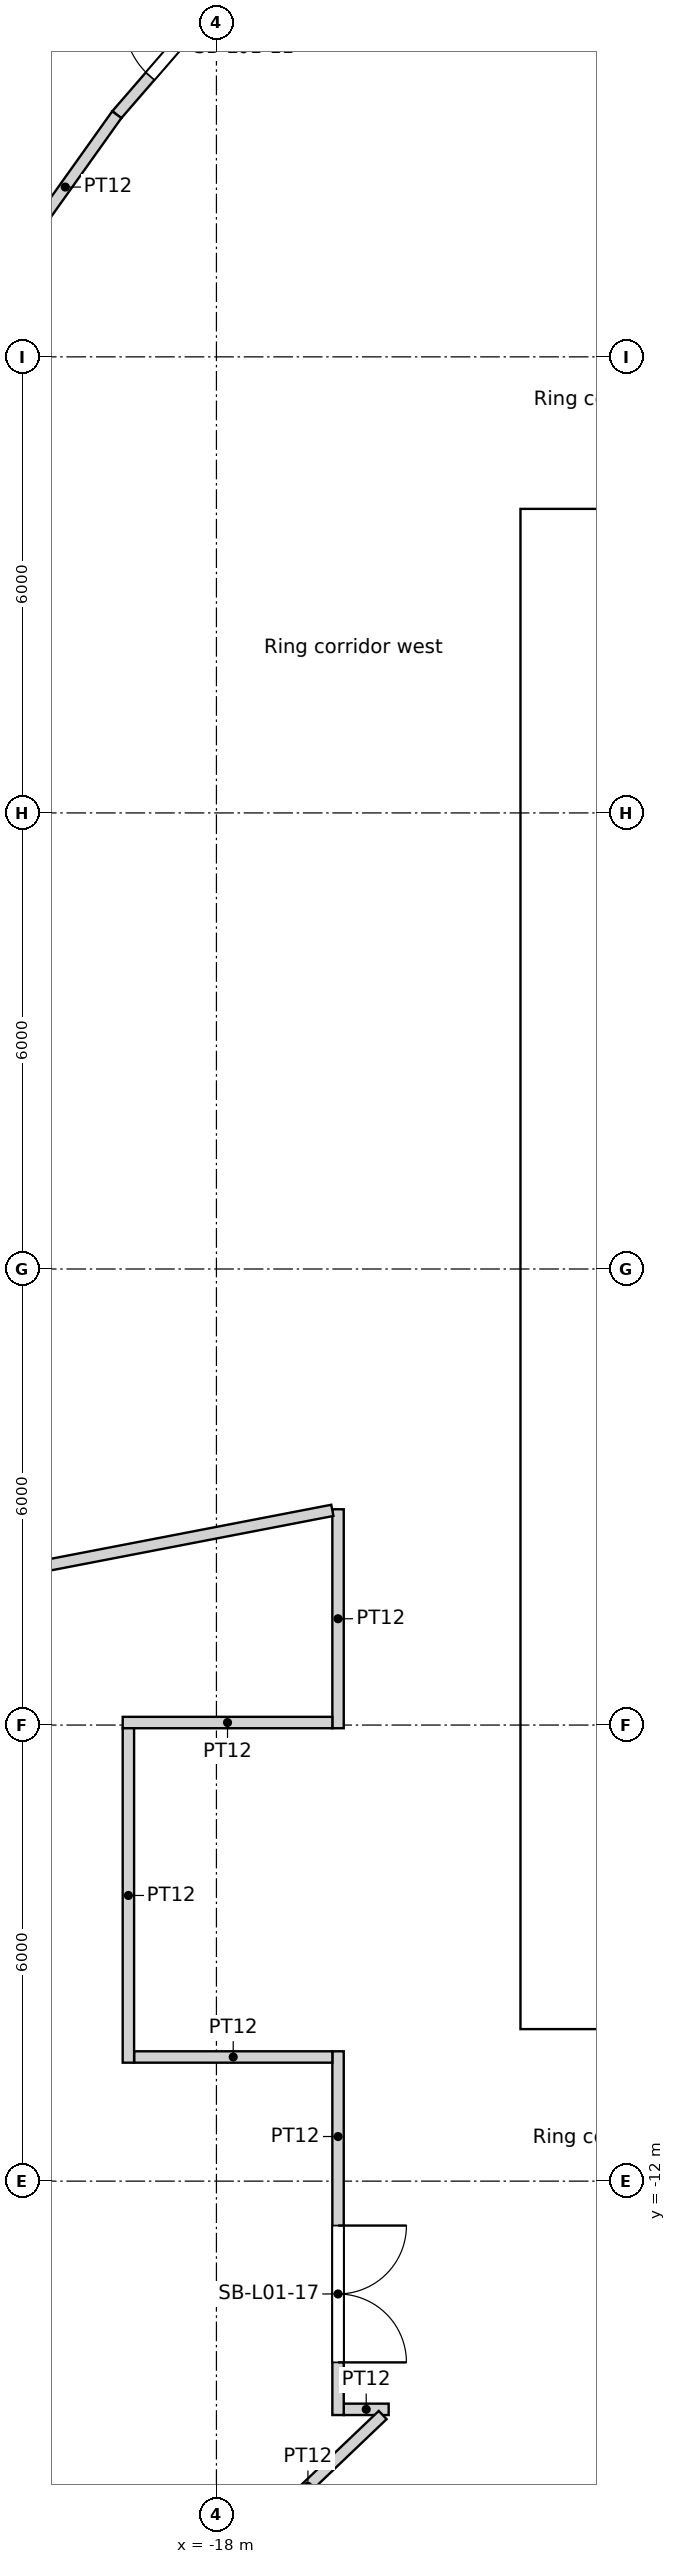
"""IFC4 building model, lengths in metres.
Left out: names, types, materials, properties, quantities, classifications, styles, units other than length and angle.
Written with IfcOpenShell. Run it as: python <this file> out.ifc"""

import sys

from ifc_helpers import new_model, si_unit, direction, frame, frame_2d, origin, origin_2d, place, context, subcontext, project, spatial, rectangle, circle, extrude, element, fill, save


model = new_model("IFC4")
c1 = context("Model", 3, precision=1e-05, world=origin(), true_north=direction((0.0, 1.0)))
c2 = subcontext(c1, "Body", "Model", "MODEL_VIEW")
j1 = project(units=[si_unit("LENGTHUNIT", "METRE"), si_unit("PLANEANGLEUNIT", "RADIAN")], contexts=[c1])
p1 = place(None, origin())
s1 = spatial("IfcSite", under=j1, at=p1, CompositionType="ELEMENT")
p2 = place(p1, origin())
s2 = spatial("IfcBuilding", under=s1, at=p2, CompositionType="ELEMENT")
p3 = place(p2, frame((0.0, 0.0, 9.0)))
s3 = spatial("IfcBuildingStorey", under=s2, at=p3, CompositionType="ELEMENT", Elevation=9.0)
for number, where, z_axis, x_axis in (
    (1, (-20.509, 13.489, 0.0), (0.0, 0.0, 1.0), (1.0, 0.0, 0.0)),
    (2, (-20.509, -13.489, 0.0), (0.0, 0.0, 1.0), (1.0, 0.0, 0.0)),
):
    element("IfcColumn", number, at=place(p3, frame(where, z_axis=z_axis, x_axis=x_axis)), inside=s3, PredefinedType="COLUMN", context=c2, shape_type="SweptSolid", body=[
        extrude(circle(Radius=0.75, at=origin_2d()), origin(), (0.0, 0.0, 1.0), 4.8),
    ])
for number, where, z_axis, x_axis in (
    (3, (-13.798, 12.802, 0.0), (0.0, 0.0, 1.0), (1.0, 0.0, 0.0)),
    (4, (-16.958, 8.167, 0.0), (0.0, 0.0, 1.0), (1.0, 0.0, 0.0)),
    (5, (-18.612, 2.805, 0.0), (0.0, 0.0, 1.0), (1.0, 0.0, 0.0)),
    (6, (-18.612, -2.805, 0.0), (0.0, 0.0, 1.0), (1.0, 0.0, 0.0)),
    (7, (-16.958, -8.167, 0.0), (0.0, 0.0, 1.0), (1.0, 0.0, 0.0)),
    (8, (-13.798, -12.802, 0.0), (0.0, 0.0, 1.0), (1.0, 0.0, 0.0)),
):
    element("IfcColumn", number, at=place(p3, frame(where, z_axis=z_axis, x_axis=x_axis)), inside=s3, PredefinedType="COLUMN", context=c2, shape_type="SweptSolid", body=[
        extrude(circle(Radius=0.8, at=origin_2d()), origin(), (0.0, 0.0, 1.0), 4.8),
    ])
p4 = place(p3, frame((-14.0, -9.4, 0.0), z_axis=(0.0, 0.0, 1.0), x_axis=(1.0, 0.0, 0.0)))
e9 = element("IfcWall", 9, at=p4, inside=s3, PredefinedType="SOLIDWALL", context=c2, shape_type="SweptSolid", body=[
    extrude(rectangle(XDim=28.0, YDim=1.2, at=frame_2d((14.0, 0.0))), origin(), (0.0, 0.0, 1.0), 4.8),
])
p5 = place(p4, frame((14.9, 0.0, 0.0)))
e10 = element("IfcOpeningElement", 10, at=p5, cuts=e9, PredefinedType="OPENING", context=c2, shape_type="SweptSolid", body=[
    extrude(rectangle(XDim=1.0, YDim=2.1, at=frame_2d((0.5, 1.05))), frame((0.0, 0.6, 0.0), z_axis=(0.0, -1.0, 0.0), x_axis=(1.0, 0.0, 0.0)), (0.0, 0.0, 1.0), 1.2),
])
p6 = place(p4, frame((9.8, 0.0, 0.0)))
e11 = element("IfcOpeningElement", 11, at=p6, cuts=e9, PredefinedType="OPENING", context=c2, shape_type="SweptSolid", body=[
    extrude(rectangle(XDim=1.8, YDim=2.1, at=frame_2d((0.9, 1.05))), frame((0.0, 0.6, 0.0), z_axis=(0.0, -1.0, 0.0), x_axis=(1.0, 0.0, 0.0)), (0.0, 0.0, 1.0), 1.2),
])
p7 = place(p4, frame((16.4, 0.0, 0.0)))
e12 = element("IfcOpeningElement", 12, at=p7, cuts=e9, PredefinedType="OPENING", context=c2, shape_type="SweptSolid", body=[
    extrude(rectangle(XDim=1.8, YDim=2.1, at=frame_2d((0.9, 1.05))), frame((0.0, 0.6, 0.0), z_axis=(0.0, -1.0, 0.0), x_axis=(1.0, 0.0, 0.0)), (0.0, 0.0, 1.0), 1.2),
])
p8 = place(p3, frame((-14.0, 9.4, 0.0), z_axis=(0.0, 0.0, 1.0), x_axis=(1.0, 0.0, 0.0)))
e13 = element("IfcWall", 13, at=p8, inside=s3, PredefinedType="SOLIDWALL", context=c2, shape_type="SweptSolid", body=[
    extrude(rectangle(XDim=28.0, YDim=1.2, at=frame_2d((14.0, 0.0))), origin(), (0.0, 0.0, 1.0), 4.8),
])
p9 = place(p8, frame((9.8, 0.0, 0.0)))
e14 = element("IfcOpeningElement", 14, at=p9, cuts=e13, PredefinedType="OPENING", context=c2, shape_type="SweptSolid", body=[
    extrude(rectangle(XDim=1.8, YDim=2.1, at=frame_2d((0.9, 1.05))), frame((0.0, 0.6, 0.0), z_axis=(0.0, -1.0, 0.0), x_axis=(1.0, 0.0, 0.0)), (0.0, 0.0, 1.0), 1.2),
])
p10 = place(p3, frame((-13.4, -8.8, 0.0), z_axis=(0.0, 0.0, 1.0), x_axis=(0.0, 1.0, 0.0)))
e15 = element("IfcWall", 15, at=p10, inside=s3, PredefinedType="SOLIDWALL", context=c2, shape_type="SweptSolid", body=[
    extrude(rectangle(XDim=17.6, YDim=1.2, at=frame_2d((8.8, 0.0))), origin(), (0.0, 0.0, 1.0), 4.8),
])
p11 = place(p10, frame((5.2, 0.0, 0.0)))
e16 = element("IfcOpeningElement", 16, at=p11, cuts=e15, PredefinedType="OPENING", context=c2, shape_type="SweptSolid", body=[
    extrude(rectangle(XDim=1.0, YDim=2.1, at=frame_2d((0.5, 1.05))), frame((0.0, 0.6, 0.0), z_axis=(0.0, -1.0, 0.0), x_axis=(1.0, 0.0, 0.0)), (0.0, 0.0, 1.0), 1.2),
])
p12 = place(p10, frame((11.4, 0.0, 0.0)))
e17 = element("IfcOpeningElement", 17, at=p12, cuts=e15, PredefinedType="OPENING", context=c2, shape_type="SweptSolid", body=[
    extrude(rectangle(XDim=1.0, YDim=2.1, at=frame_2d((0.5, 1.05))), frame((0.0, 0.6, 0.0), z_axis=(0.0, -1.0, 0.0), x_axis=(1.0, 0.0, 0.0)), (0.0, 0.0, 1.0), 1.2),
])
p13 = place(p3, frame((-25.548, -4.924, 0.0), z_axis=(0.0, 0.0, 1.0), x_axis=(0.981926640708, 0.189261914468, 0.0)))
e18 = element("IfcWall", 18, at=p13, inside=s3, PredefinedType="PARTITIONING", context=c2, shape_type="SweptSolid", body=[
    extrude(rectangle(XDim=9.24, YDim=0.15, at=frame_2d((4.62, 0.0))), origin(), (0.0, 0.0, 1.0), 3.75),
])
p14 = place(p3, frame((-19.311, 15.186, 0.0), z_axis=(0.0, 0.0, 1.0), x_axis=(-0.580032319147, -0.814593462252, 0.0)))
e19 = element("IfcWall", 19, at=p14, inside=s3, PredefinedType="PARTITIONING", context=c2, shape_type="SweptSolid", body=[
    extrude(rectangle(XDim=2.338, YDim=0.15, at=frame_2d((1.169, 0.0))), origin(), (0.0, 0.0, 1.0), 3.75),
])
p15 = place(p3, frame((-19.083, -10.367, 0.0), z_axis=(0.0, 0.0, 1.0), x_axis=(1.0, 0.0, 0.0)))
e20 = element("IfcWall", 20, at=p15, inside=s3, PredefinedType="PARTITIONING", context=c2, shape_type="SweptSolid", body=[
    extrude(rectangle(XDim=2.608, YDim=0.15, at=frame_2d((1.304, 0.0))), origin(), (0.0, 0.0, 1.0), 3.75),
])
p16 = place(p3, frame((-19.158, -6.042, 0.0), z_axis=(0.0, 0.0, 1.0), x_axis=(0.0, -1.0, 0.0)))
e21 = element("IfcWall", 21, at=p16, inside=s3, PredefinedType="PARTITIONING", context=c2, shape_type="SweptSolid", body=[
    extrude(rectangle(XDim=4.4, YDim=0.15, at=frame_2d((2.2, 0.0))), origin(), (0.0, 0.0, 1.0), 3.75),
])
p17 = place(p3, frame((-18.112, 25.435, 0.0), z_axis=(0.0, 0.0, 1.0), x_axis=(0.580054828861, -0.814577433713, 0.0)))
e22 = element("IfcWall", 22, at=p17, inside=s3, PredefinedType="PARTITIONING", context=c2, shape_type="SweptSolid", body=[
    extrude(rectangle(XDim=15.894, YDim=0.175, at=frame_2d((7.947, 0.0))), origin(), (0.0, 0.0, 1.0), 3.75),
])
p18 = place(p3, frame((-17.78, -16.953, 0.0), z_axis=(0.0, 0.0, 1.0), x_axis=(0.723749021552, 0.690063296954, 0.0)))
e23 = element("IfcWall", 23, at=p18, inside=s3, PredefinedType="PARTITIONING", context=c2, shape_type="SweptSolid", body=[
    extrude(rectangle(XDim=2.718, YDim=0.15, at=frame_2d((1.359, 0.0))), origin(), (0.0, 0.0, 1.0), 3.75),
])
p19 = place(p3, frame((-19.311, 15.186, 0.0), z_axis=(0.0, 0.0, 1.0), x_axis=(0.654866925236, 0.755744209526, 0.0)))
e24 = element("IfcWall", 24, at=p19, inside=s3, PredefinedType="PARTITIONING", context=c2, shape_type="SweptSolid", body=[
    extrude(rectangle(XDim=2.338, YDim=0.15, at=frame_2d((1.169, 0.0))), origin(), (0.0, 0.0, 1.0), 3.75),
])
p20 = place(p19, frame((0.669, 0.0, 0.0)))
e25 = element("IfcOpeningElement", 25, at=p20, cuts=e24, PredefinedType="OPENING", context=c2, shape_type="SweptSolid", body=[
    extrude(rectangle(XDim=1.0, YDim=2.1, at=frame_2d((0.5, 1.05))), frame((0.0, 0.075, 0.0), z_axis=(0.0, -1.0, 0.0), x_axis=(1.0, 0.0, 0.0)), (0.0, 0.0, 1.0), 0.15),
])
p21 = place(p3, frame((-16.325, -15.002, 0.0), z_axis=(0.0, 0.0, 1.0), x_axis=(1.0, 0.0, 0.0)))
e26 = element("IfcWall", 26, at=p21, inside=s3, PredefinedType="PARTITIONING", context=c2, shape_type="SweptSolid", body=[
    extrude(rectangle(XDim=0.591, YDim=0.15, at=frame_2d((0.295, 0.0))), origin(), (0.0, 0.0, 1.0), 3.75),
])
p22 = place(p3, frame((-16.4, -15.077, 0.0), z_axis=(0.0, 0.0, 1.0), x_axis=(0.0, 1.0, 0.0)))
e27 = element("IfcWall", 27, at=p22, inside=s3, PredefinedType="PARTITIONING", context=c2, shape_type="SweptSolid", body=[
    extrude(rectangle(XDim=4.786, YDim=0.15, at=frame_2d((2.393, 0.0))), origin(), (0.0, 0.0, 1.0), 3.75),
])
p23 = place(p22, frame((0.693, 0.0, 0.0)))
e28 = element("IfcOpeningElement", 28, at=p23, cuts=e27, PredefinedType="OPENING", context=c2, shape_type="SweptSolid", body=[
    extrude(rectangle(XDim=1.8, YDim=2.4, at=frame_2d((0.9, 1.2))), frame((0.0, 0.075, 0.0), z_axis=(0.0, -1.0, 0.0), x_axis=(1.0, 0.0, 0.0)), (0.0, 0.0, 1.0), 0.15),
])
p24 = place(p3, frame((-16.475, -5.967, 0.0), z_axis=(0.0, 0.0, 1.0), x_axis=(-1.0, 0.0, 0.0)))
e29 = element("IfcWall", 29, at=p24, inside=s3, PredefinedType="PARTITIONING", context=c2, shape_type="SweptSolid", body=[
    extrude(rectangle(XDim=2.758, YDim=0.15, at=frame_2d((1.379, 0.0))), origin(), (0.0, 0.0, 1.0), 3.75),
])
p25 = place(p3, frame((-16.4, -3.161, 0.0), z_axis=(0.0, 0.0, 1.0), x_axis=(0.0, -1.0, 0.0)))
e30 = element("IfcWall", 30, at=p25, inside=s3, PredefinedType="PARTITIONING", context=c2, shape_type="SweptSolid", body=[
    extrude(rectangle(XDim=2.881, YDim=0.15, at=frame_2d((1.44, 0.0))), origin(), (0.0, 0.0, 1.0), 3.75),
])
p26 = place(p11, origin())
e31 = element("IfcDoor", 31, at=p26, inside=s3, OperationType="DOUBLE_DOOR_SINGLE_SWING", PredefinedType="DOOR", context=c2, shape_type="SweptSolid", body=[
    extrude(rectangle(XDim=1.0, YDim=2.1, at=frame_2d((0.5, 1.05))), frame((0.0, 0.025, 0.0), z_axis=(0.0, -1.0, 0.0), x_axis=(1.0, 0.0, 0.0)), (0.0, 0.0, 1.0), 0.05),
])
fill(e16, e31)
p27 = place(p12, origin())
e32 = element("IfcDoor", 32, at=p27, inside=s3, OperationType="DOUBLE_DOOR_SINGLE_SWING", PredefinedType="DOOR", context=c2, shape_type="SweptSolid", body=[
    extrude(rectangle(XDim=1.0, YDim=2.1, at=frame_2d((0.5, 1.05))), frame((0.0, 0.025, 0.0), z_axis=(0.0, -1.0, 0.0), x_axis=(1.0, 0.0, 0.0)), (0.0, 0.0, 1.0), 0.05),
])
fill(e17, e32)
p28 = place(p20, origin())
e33 = element("IfcDoor", 33, at=p28, inside=s3, OperationType="SINGLE_SWING_RIGHT", PredefinedType="DOOR", context=c2, shape_type="SweptSolid", body=[
    extrude(rectangle(XDim=1.0, YDim=2.1, at=frame_2d((0.5, 1.05))), frame((0.0, 0.025, 0.0), z_axis=(0.0, -1.0, 0.0), x_axis=(1.0, 0.0, 0.0)), (0.0, 0.0, 1.0), 0.05),
])
fill(e25, e33)
p29 = place(p23, origin())
e34 = element("IfcDoor", 34, at=p29, inside=s3, OperationType="DOUBLE_DOOR_SINGLE_SWING", PredefinedType="DOOR", context=c2, shape_type="SweptSolid", body=[
    extrude(rectangle(XDim=1.8, YDim=2.4, at=frame_2d((0.9, 1.2))), frame((0.0, 0.025, 0.0), z_axis=(0.0, -1.0, 0.0), x_axis=(1.0, 0.0, 0.0)), (0.0, 0.0, 1.0), 0.05),
])
fill(e28, e34)
save(model, sys.argv[1])
